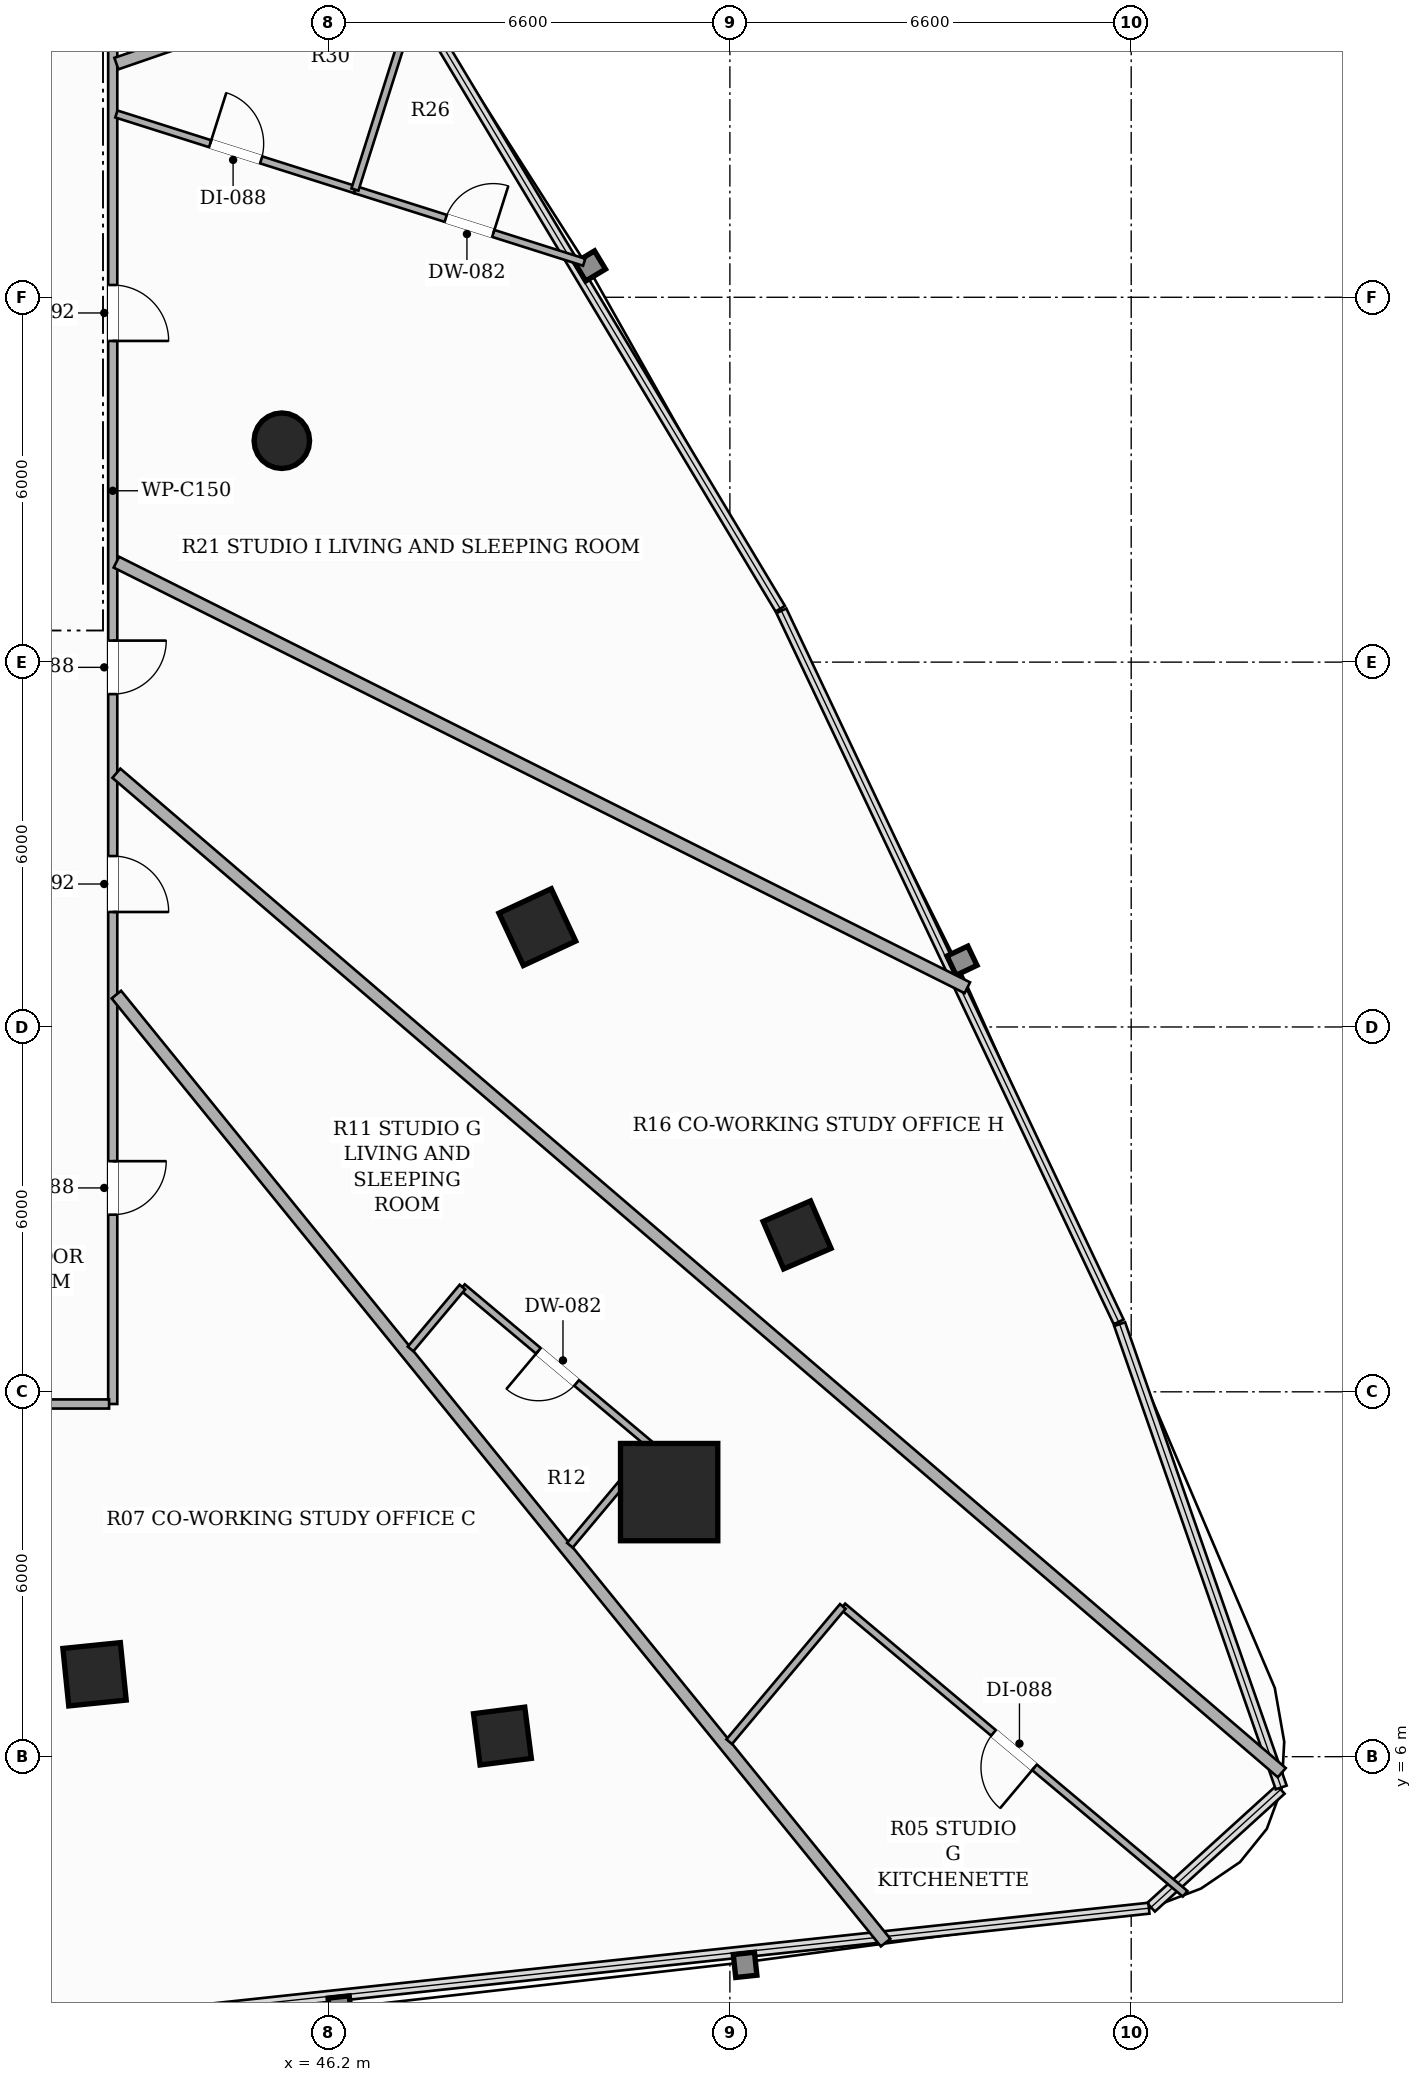
"""IFC4 building model, lengths in metres.
Left out: names, types, materials, properties, quantities, classifications, styles, units other than length and angle.
Written with IfcOpenShell. Run it as: python <this file> out.ifc"""

import sys

from ifc_helpers import new_model, si_unit, direction, frame, frame_2d, origin, origin_2d, place, context, subcontext, project, spatial, rectangle, hollow_rectangle, hollow_circle, extrude, element, fill, save


model = new_model("IFC4")
c1 = context("Model", 3, precision=1e-05, world=origin(), true_north=direction((0.0, 1.0)))
c2 = subcontext(c1, "Body", "Model", "MODEL_VIEW")
j1 = project(units=[si_unit("LENGTHUNIT", "METRE"), si_unit("PLANEANGLEUNIT", "RADIAN")], contexts=[c1])
p1 = place(None, origin())
s1 = spatial("IfcSite", under=j1, at=p1, CompositionType="ELEMENT")
p2 = place(p1, origin())
s2 = spatial("IfcBuilding", under=s1, at=p2, CompositionType="ELEMENT")
p3 = place(p2, frame((0.0, 0.0, 36.8)))
s3 = spatial("IfcBuildingStorey", under=s2, at=p3, CompositionType="ELEMENT", Elevation=36.8)
p4 = place(p3, frame((51.801, 10.351, 0.0), z_axis=(0.0, 0.0, 1.0), x_axis=(1.0, 0.0, 0.0)))
e1 = element("IfcColumn", 1, at=p4, inside=s3, PredefinedType="COLUMN", context=c2, shape_type="SweptSolid", body=[
    extrude(hollow_rectangle(XDim=1.6, YDim=1.6, WallThickness=0.05, at=origin_2d()), origin(), (0.0, 0.0, 1.0), 3.3),
])
for number, where, z_axis, x_axis in (
    (2, (42.351, 7.355, 0.0), (0.0, 0.0, 1.0), (0.995, 0.101, 0.0)),
    (3, (49.633, 19.642, 0.0), (0.0, 0.0, 1.0), (-0.423, 0.906, 0.0)),
):
    element("IfcColumn", number, at=place(p3, frame(where, z_axis=z_axis, x_axis=x_axis)), inside=s3, PredefinedType="COLUMN", context=c2, shape_type="SweptSolid", body=[
        extrude(hollow_rectangle(XDim=0.95, YDim=0.95, WallThickness=0.032, at=origin_2d()), origin(), (0.0, 0.0, 1.0), 3.3),
    ])
p5 = place(p3, frame((45.431, 27.641, 0.0), z_axis=(0.0, 0.0, 1.0), x_axis=(1.0, 0.0, 0.0)))
e4 = element("IfcColumn", 4, at=p5, inside=s3, PredefinedType="COLUMN", context=c2, shape_type="SweptSolid", body=[
    extrude(hollow_circle(Radius=0.457, WallThickness=0.025, at=origin_2d()), origin(), (0.0, 0.0, 1.0), 3.3),
])
for number, where, z_axis, x_axis in (
    (5, (49.059, 6.339, 0.0), (0.0, 0.0, 1.0), (0.992, 0.127, 0.0)),
    (6, (53.905, 14.58, 0.0), (0.0, 0.0, 1.0), (-0.397, 0.918, 0.0)),
):
    element("IfcColumn", number, at=place(p3, frame(where, z_axis=z_axis, x_axis=x_axis)), inside=s3, PredefinedType="COLUMN", context=c2, shape_type="SweptSolid", body=[
        extrude(hollow_rectangle(XDim=0.85, YDim=0.85, WallThickness=0.028, at=origin_2d()), origin(), (0.0, 0.0, 1.0), 3.3),
    ])
p6 = place(p3, frame((42.65, 36.84, 0.0), z_axis=(0.0, 0.0, 1.0), x_axis=(0.0, -1.0, 0.0)))
e7 = element("IfcWall", 7, at=p6, inside=s3, PredefinedType="PARTITIONING", context=c2, shape_type="SweptSolid", body=[
    extrude(rectangle(XDim=25.04, YDim=0.15, at=frame_2d((12.52, 0.0))), origin(), (0.0, 0.0, 1.0), 2.413),
])
p7 = place(p6, frame((1.219, 0.0, 0.0)))
e8 = element("IfcOpeningElement", 8, at=p7, cuts=e7, PredefinedType="OPENING", context=c2, shape_type="SweptSolid", body=[
    extrude(rectangle(XDim=0.88, YDim=2.1, at=frame_2d((0.44, 1.05))), frame((0.0, 0.085, 0.0), z_axis=(0.0, -1.0, 0.0), x_axis=(1.0, 0.0, 0.0)), (0.0, 0.0, 1.0), 0.17),
])
p8 = place(p6, frame((21.047, 0.0, 0.0)))
e9 = element("IfcOpeningElement", 9, at=p8, cuts=e7, PredefinedType="OPENING", context=c2, shape_type="SweptSolid", body=[
    extrude(rectangle(XDim=0.88, YDim=2.1, at=frame_2d((0.44, 1.05))), frame((0.0, 0.085, 0.0), z_axis=(0.0, -1.0, 0.0), x_axis=(1.0, 0.0, 0.0)), (0.0, 0.0, 1.0), 0.17),
])
p9 = place(p6, frame((16.029, 0.0, 0.0)))
e10 = element("IfcOpeningElement", 10, at=p9, cuts=e7, PredefinedType="OPENING", context=c2, shape_type="SweptSolid", body=[
    extrude(rectangle(XDim=0.92, YDim=2.15, at=frame_2d((0.46, 1.075))), frame((0.0, 0.085, 0.0), z_axis=(0.0, -1.0, 0.0), x_axis=(1.0, 0.0, 0.0)), (0.0, 0.0, 1.0), 0.17),
])
p10 = place(p6, frame((12.486, 0.0, 0.0)))
e11 = element("IfcOpeningElement", 11, at=p10, cuts=e7, PredefinedType="OPENING", context=c2, shape_type="SweptSolid", body=[
    extrude(rectangle(XDim=0.88, YDim=2.1, at=frame_2d((0.44, 1.05))), frame((0.0, 0.085, 0.0), z_axis=(0.0, -1.0, 0.0), x_axis=(1.0, 0.0, 0.0)), (0.0, 0.0, 1.0), 0.17),
])
p11 = place(p6, frame((6.638, 0.0, 0.0)))
e12 = element("IfcOpeningElement", 12, at=p11, cuts=e7, PredefinedType="OPENING", context=c2, shape_type="SweptSolid", body=[
    extrude(rectangle(XDim=0.92, YDim=2.15, at=frame_2d((0.46, 1.075))), frame((0.0, 0.085, 0.0), z_axis=(0.0, -1.0, 0.0), x_axis=(1.0, 0.0, 0.0)), (0.0, 0.0, 1.0), 0.17),
])
p12 = place(p3, frame((42.59, 11.8, 0.0), z_axis=(0.0, 0.0, 1.0), x_axis=(-1.0, 0.0, 0.0)))
e13 = element("IfcWall", 13, at=p12, inside=s3, PredefinedType="PARTITIONING", context=c2, shape_type="SweptSolid", body=[
    extrude(rectangle(XDim=19.24, YDim=0.15, at=frame_2d((9.62, 0.0))), origin(), (0.0, 0.0, 1.0), 2.669),
])
p13 = place(p12, frame((10.462, 0.0, 0.0)))
e14 = element("IfcOpeningElement", 14, at=p13, cuts=e13, PredefinedType="OPENING", context=c2, shape_type="SweptSolid", body=[
    extrude(rectangle(XDim=0.92, YDim=2.15, at=frame_2d((0.46, 1.075))), frame((0.0, 0.085, 0.0), z_axis=(0.0, -1.0, 0.0), x_axis=(1.0, 0.0, 0.0)), (0.0, 0.0, 1.0), 0.17),
])
p14 = place(p3, frame((47.304, 35.425, 0.0), z_axis=(0.0, 0.0, 1.0), x_axis=(-0.945506397197, -0.325603520956, 0.0)))
e15 = element("IfcWall", 15, at=p14, inside=s3, PredefinedType="PARTITIONING", context=c2, shape_type="SweptSolid", body=[
    extrude(rectangle(XDim=4.859, YDim=0.2, at=frame_2d((2.429, 0.0))), origin(), (0.0, 0.0, 1.0), 3.06),
])
p15 = place(p3, frame((42.71, 18.533, 0.0), z_axis=(0.0, 0.0, 1.0), x_axis=(0.630093983448, -0.776518880661, 0.0)))
e16 = element("IfcWall", 16, at=p15, inside=s3, PredefinedType="PARTITIONING", context=c2, shape_type="SweptSolid", body=[
    extrude(rectangle(XDim=20.078, YDim=0.2, at=frame_2d((10.039, 0.0))), origin(), (0.0, 0.0, 1.0), 2.413),
])
p16 = place(p3, frame((42.71, 22.173, 0.0), z_axis=(0.0, 0.0, 1.0), x_axis=(0.759115981911, -0.650955394791, 0.0)))
e17 = element("IfcWall", 17, at=p16, inside=s3, PredefinedType="PARTITIONING", context=c2, shape_type="SweptSolid", body=[
    extrude(rectangle(XDim=25.249, YDim=0.2, at=frame_2d((12.625, 0.0))), origin(), (0.0, 0.0, 1.0), 2.413),
])
p17 = place(p3, frame((42.71, 25.644, 0.0), z_axis=(0.0, 0.0, 1.0), x_axis=(0.894389742198, -0.447288485265, 0.0)))
e18 = element("IfcWall", 18, at=p17, inside=s3, PredefinedType="PARTITIONING", context=c2, shape_type="SweptSolid", body=[
    extrude(rectangle(XDim=15.648, YDim=0.2, at=frame_2d((7.824, 0.0))), origin(), (0.0, 0.0, 1.0), 2.413),
])
p18 = place(p3, frame((50.169, 9.476, 0.0), z_axis=(0.0, 0.0, 1.0), x_axis=(0.642802339764, 0.766032082875, 0.0)))
e19 = element("IfcWall", 19, at=p18, inside=s3, PredefinedType="PARTITIONING", context=c2, shape_type="SweptSolid", body=[
    extrude(rectangle(XDim=2.116, YDim=0.12, at=frame_2d((1.058, 0.0))), origin(), (0.0, 0.0, 1.0), 2.413),
])
p19 = place(p3, frame((51.529, 11.097, 0.0), z_axis=(0.0, 0.0, 1.0), x_axis=(-0.766026296222, 0.642809235696, 0.0)))
e20 = element("IfcWall", 20, at=p19, inside=s3, PredefinedType="PARTITIONING", context=c2, shape_type="SweptSolid", body=[
    extrude(rectangle(XDim=4.084, YDim=0.12, at=frame_2d((2.042, 0.0))), origin(), (0.0, 0.0, 1.0), 2.413),
])
p20 = place(p19, frame((1.632, 0.0, 0.0)))
e21 = element("IfcOpeningElement", 21, at=p20, cuts=e20, PredefinedType="OPENING", context=c2, shape_type="SweptSolid", body=[
    extrude(rectangle(XDim=0.82, YDim=2.1, at=frame_2d((0.41, 1.05))), frame((0.0, 0.07, 0.0), z_axis=(0.0, -1.0, 0.0), x_axis=(1.0, 0.0, 0.0)), (0.0, 0.0, 1.0), 0.14),
])
p21 = place(p3, frame((48.401, 13.722, 0.0), z_axis=(0.0, 0.0, 1.0), x_axis=(-0.642587875402, -0.76621199572, 0.0)))
e22 = element("IfcWall", 22, at=p21, inside=s3, PredefinedType="PARTITIONING", context=c2, shape_type="SweptSolid", body=[
    extrude(rectangle(XDim=1.327, YDim=0.12, at=frame_2d((0.664, 0.0))), origin(), (0.0, 0.0, 1.0), 3.06),
])
p22 = place(p3, frame((60.287, 3.745, 0.0), z_axis=(0.0, 0.0, 1.0), x_axis=(-0.765937745649, 0.642914745351, 0.0)))
e23 = element("IfcWall", 23, at=p22, inside=s3, PredefinedType="PARTITIONING", context=c2, shape_type="SweptSolid", body=[
    extrude(rectangle(XDim=7.351, YDim=0.12, at=frame_2d((3.675, 0.0))), origin(), (0.0, 0.0, 1.0), 2.619),
])
p23 = place(p22, frame((3.235, 0.0, 0.0)))
e24 = element("IfcOpeningElement", 24, at=p23, cuts=e23, PredefinedType="OPENING", context=c2, shape_type="SweptSolid", body=[
    extrude(rectangle(XDim=0.88, YDim=2.1, at=frame_2d((0.44, 1.05))), frame((0.0, 0.07, 0.0), z_axis=(0.0, -1.0, 0.0), x_axis=(1.0, 0.0, 0.0)), (0.0, 0.0, 1.0), 0.14),
])
p24 = place(p3, frame((54.657, 8.471, 0.0), z_axis=(0.0, 0.0, 1.0), x_axis=(-0.6429989132, -0.765867088746, 0.0)))
e25 = element("IfcWall", 25, at=p24, inside=s3, PredefinedType="PARTITIONING", context=c2, shape_type="SweptSolid", body=[
    extrude(rectangle(XDim=2.905, YDim=0.12, at=frame_2d((1.453, 0.0))), origin(), (0.0, 0.0, 1.0), 3.06),
])
p25 = place(p3, frame((46.633, 31.771, 0.0), z_axis=(0.0, 0.0, 1.0), x_axis=(0.953252758263, -0.302174087016, 0.0)))
e26 = element("IfcWall", 26, at=p25, inside=s3, PredefinedType="PARTITIONING", context=c2, shape_type="SweptSolid", body=[
    extrude(rectangle(XDim=3.955, YDim=0.12, at=frame_2d((1.978, 0.0))), origin(), (0.0, 0.0, 1.0), 3.06),
])
p26 = place(p25, frame((1.567, 0.0, 0.0)))
e27 = element("IfcOpeningElement", 27, at=p26, cuts=e26, PredefinedType="OPENING", context=c2, shape_type="SweptSolid", body=[
    extrude(rectangle(XDim=0.82, YDim=2.1, at=frame_2d((0.41, 1.05))), frame((0.0, 0.07, 0.0), z_axis=(0.0, -1.0, 0.0), x_axis=(1.0, 0.0, 0.0)), (0.0, 0.0, 1.0), 0.14),
])
p27 = place(p3, frame((42.71, 33.014, 0.0), z_axis=(0.0, 0.0, 1.0), x_axis=(0.953299814988, -0.302025599484, 0.0)))
e28 = element("IfcWall", 28, at=p27, inside=s3, PredefinedType="PARTITIONING", context=c2, shape_type="SweptSolid", body=[
    extrude(rectangle(XDim=4.115, YDim=0.12, at=frame_2d((2.058, 0.0))), origin(), (0.0, 0.0, 1.0), 3.06),
])
p28 = place(p27, frame((1.618, 0.0, 0.0)))
e29 = element("IfcOpeningElement", 29, at=p28, cuts=e28, PredefinedType="OPENING", context=c2, shape_type="SweptSolid", body=[
    extrude(rectangle(XDim=0.88, YDim=2.1, at=frame_2d((0.44, 1.05))), frame((0.0, 0.07, 0.0), z_axis=(0.0, -1.0, 0.0), x_axis=(1.0, 0.0, 0.0)), (0.0, 0.0, 1.0), 0.14),
])
p29 = place(p3, frame((46.633, 31.771, 0.0), z_axis=(0.0, 0.0, 1.0), x_axis=(0.301799891186, 0.953371294764, 0.0)))
e30 = element("IfcWall", 30, at=p29, inside=s3, PredefinedType="PARTITIONING", context=c2, shape_type="SweptSolid", body=[
    extrude(rectangle(XDim=3.303, YDim=0.12, at=frame_2d((1.651, 0.0))), origin(), (0.0, 0.0, 1.0), 3.06),
])
p30 = place(p8, origin())
e31 = element("IfcDoor", 31, at=p30, inside=s3, OperationType="SINGLE_SWING_LEFT", PredefinedType="DOOR", context=c2, shape_type="SweptSolid", body=[
    extrude(rectangle(XDim=0.88, YDim=2.1, at=frame_2d((0.44, 1.05))), frame((0.0, 0.025, 0.0), z_axis=(0.0, -1.0, 0.0), x_axis=(1.0, 0.0, 0.0)), (0.0, 0.0, 1.0), 0.05),
])
fill(e9, e31)
p31 = place(p9, origin())
e32 = element("IfcDoor", 32, at=p31, inside=s3, OperationType="SINGLE_SWING_RIGHT", PredefinedType="DOOR", context=c2, shape_type="SweptSolid", body=[
    extrude(rectangle(XDim=0.92, YDim=2.15, at=frame_2d((0.46, 1.075))), frame((0.0, 0.025, 0.0), z_axis=(0.0, -1.0, 0.0), x_axis=(1.0, 0.0, 0.0)), (0.0, 0.0, 1.0), 0.05),
])
fill(e10, e32)
p32 = place(p20, origin())
e33 = element("IfcDoor", 33, at=p32, inside=s3, OperationType="SINGLE_SWING_RIGHT", PredefinedType="DOOR", context=c2, shape_type="SweptSolid", body=[
    extrude(rectangle(XDim=0.82, YDim=2.1, at=frame_2d((0.41, 1.05))), frame((0.0, 0.025, 0.0), z_axis=(0.0, -1.0, 0.0), x_axis=(1.0, 0.0, 0.0)), (0.0, 0.0, 1.0), 0.05),
])
fill(e21, e33)
p33 = place(p23, origin())
e34 = element("IfcDoor", 34, at=p33, inside=s3, OperationType="SINGLE_SWING_LEFT", PredefinedType="DOOR", context=c2, shape_type="SweptSolid", body=[
    extrude(rectangle(XDim=0.88, YDim=2.1, at=frame_2d((0.44, 1.05))), frame((0.0, 0.025, 0.0), z_axis=(0.0, -1.0, 0.0), x_axis=(1.0, 0.0, 0.0)), (0.0, 0.0, 1.0), 0.05),
])
fill(e24, e34)
p34 = place(p10, origin())
e35 = element("IfcDoor", 35, at=p34, inside=s3, OperationType="SINGLE_SWING_LEFT", PredefinedType="DOOR", context=c2, shape_type="SweptSolid", body=[
    extrude(rectangle(XDim=0.88, YDim=2.1, at=frame_2d((0.44, 1.05))), frame((0.0, 0.025, 0.0), z_axis=(0.0, -1.0, 0.0), x_axis=(1.0, 0.0, 0.0)), (0.0, 0.0, 1.0), 0.05),
])
fill(e11, e35)
p35 = place(p11, origin())
e36 = element("IfcDoor", 36, at=p35, inside=s3, OperationType="SINGLE_SWING_RIGHT", PredefinedType="DOOR", context=c2, shape_type="SweptSolid", body=[
    extrude(rectangle(XDim=0.92, YDim=2.15, at=frame_2d((0.46, 1.075))), frame((0.0, 0.025, 0.0), z_axis=(0.0, -1.0, 0.0), x_axis=(1.0, 0.0, 0.0)), (0.0, 0.0, 1.0), 0.05),
])
fill(e12, e36)
p36 = place(p26, origin())
e37 = element("IfcDoor", 37, at=p36, inside=s3, OperationType="SINGLE_SWING_RIGHT", PredefinedType="DOOR", context=c2, shape_type="SweptSolid", body=[
    extrude(rectangle(XDim=0.82, YDim=2.1, at=frame_2d((0.41, 1.05))), frame((0.0, 0.025, 0.0), z_axis=(0.0, -1.0, 0.0), x_axis=(1.0, 0.0, 0.0)), (0.0, 0.0, 1.0), 0.05),
])
fill(e27, e37)
p37 = place(p28, origin())
e38 = element("IfcDoor", 38, at=p37, inside=s3, OperationType="SINGLE_SWING_LEFT", PredefinedType="DOOR", context=c2, shape_type="SweptSolid", body=[
    extrude(rectangle(XDim=0.88, YDim=2.1, at=frame_2d((0.44, 1.05))), frame((0.0, 0.025, 0.0), z_axis=(0.0, -1.0, 0.0), x_axis=(1.0, 0.0, 0.0)), (0.0, 0.0, 1.0), 0.05),
])
fill(e29, e38)
save(model, sys.argv[1])
